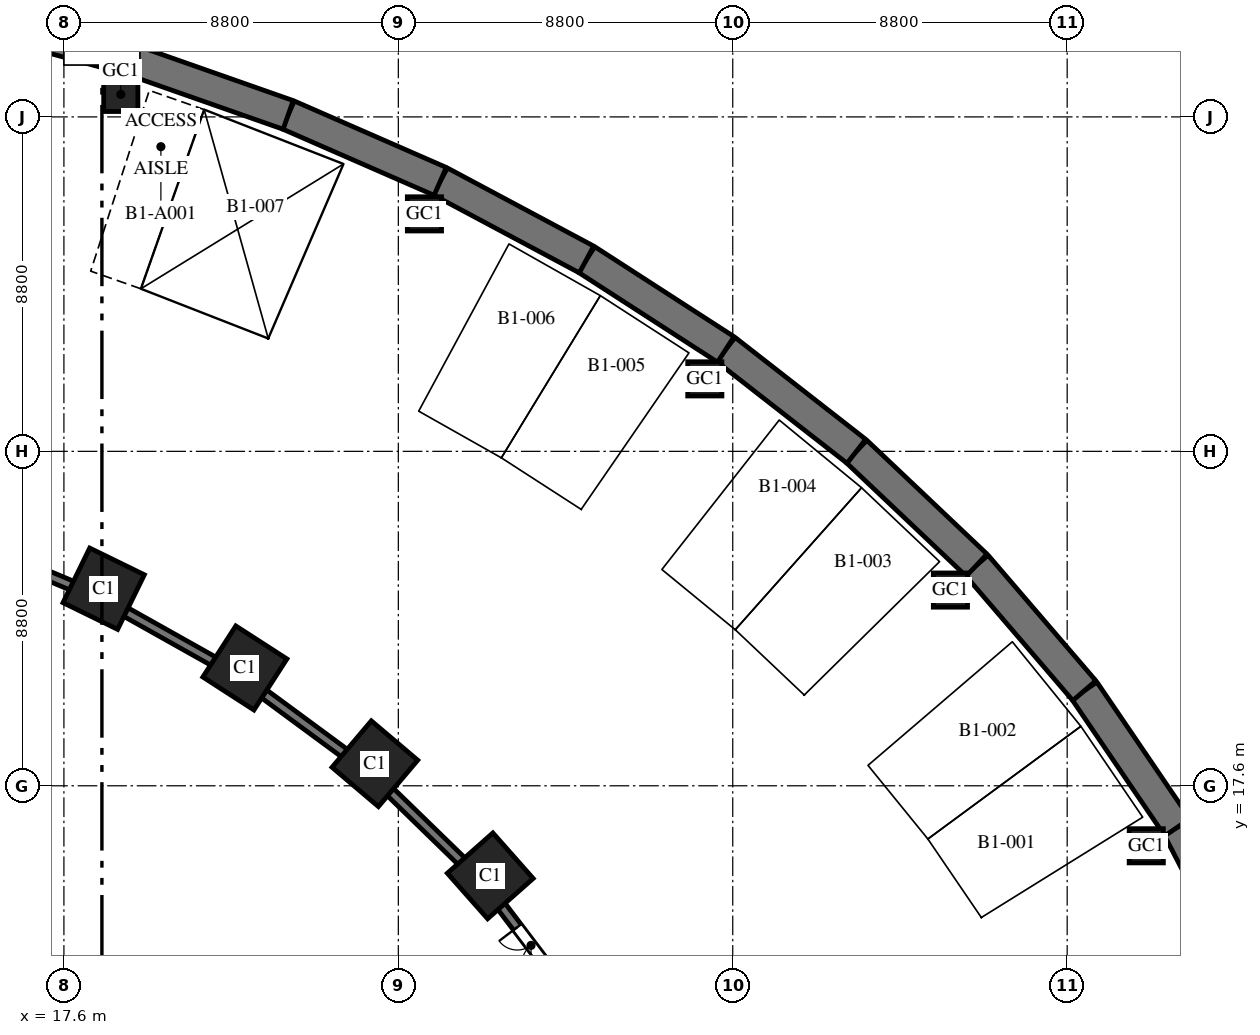
"""IFC4 building model, lengths in metres.
Left out: names, types, materials, properties, quantities, classifications, styles, units other than length and angle.
Written with IfcOpenShell. Run it as: python <this file> out.ifc"""

import sys

from ifc_helpers import new_model, si_unit, direction, frame, frame_2d, origin, origin_2d, place, context, subcontext, project, spatial, rectangle, hollow_rectangle, extrude, element, fill, save


model = new_model("IFC4")
c1 = context("Model", 3, precision=1e-05, world=origin(), true_north=direction((0.0, 1.0)))
c2 = subcontext(c1, "Body", "Model", "MODEL_VIEW")
j1 = project(units=[si_unit("LENGTHUNIT", "METRE"), si_unit("PLANEANGLEUNIT", "RADIAN")], contexts=[c1])
p1 = place(None, origin())
s1 = spatial("IfcSite", under=j1, at=p1, CompositionType="ELEMENT")
p2 = place(p1, origin())
s2 = spatial("IfcBuilding", under=s1, at=p2, CompositionType="ELEMENT")
p3 = place(p2, frame((0.0, 0.0, -4.2)))
s3 = spatial("IfcBuildingStorey", under=s2, at=p3, CompositionType="ELEMENT", Elevation=-4.2)
p4 = place(p3, frame((48.894, 12.649, 0.0), z_axis=(0.0, 0.0, 1.0), x_axis=(-0.459242531468, 0.888310923771, 0.0)))
e1 = element("IfcWall", 1, at=p4, inside=s3, PredefinedType="SOLIDWALL", context=c2, shape_type="SweptSolid", body=[
    extrude(rectangle(XDim=4.345, YDim=0.8, at=frame_2d((2.172, 0.0))), origin(), (0.0, 0.0, 1.0), 3.85),
])
p5 = place(p3, frame((46.899, 16.508, 0.0), z_axis=(0.0, 0.0, 1.0), x_axis=(-0.562667738859, 0.82668314102, 0.0)))
e2 = element("IfcWall", 2, at=p5, inside=s3, PredefinedType="SOLIDWALL", context=c2, shape_type="SweptSolid", body=[
    extrude(rectangle(XDim=4.349, YDim=0.8, at=frame_2d((2.174, 0.0))), origin(), (0.0, 0.0, 1.0), 3.85),
])
p6 = place(p3, frame((44.452, 20.104, 0.0), z_axis=(0.0, 0.0, 1.0), x_axis=(-0.651387059497, 0.758745608699, 0.0)))
e3 = element("IfcWall", 3, at=p6, inside=s3, PredefinedType="SOLIDWALL", context=c2, shape_type="SweptSolid", body=[
    extrude(rectangle(XDim=4.353, YDim=0.8, at=frame_2d((2.176, 0.0))), origin(), (0.0, 0.0, 1.0), 3.85),
])
p7 = place(p3, frame((41.617, 23.406, 0.0), z_axis=(0.0, 0.0, 1.0), x_axis=(-0.72620446032, 0.687478786444, 0.0)))
e4 = element("IfcWall", 4, at=p7, inside=s3, PredefinedType="SOLIDWALL", context=c2, shape_type="SweptSolid", body=[
    extrude(rectangle(XDim=4.356, YDim=0.8, at=frame_2d((2.178, 0.0))), origin(), (0.0, 0.0, 1.0), 3.85),
])
p8 = place(p3, frame((38.453, 26.401, 0.0), z_axis=(0.0, 0.0, 1.0), x_axis=(-0.788491985196, 0.615045030288, 0.0)))
e5 = element("IfcWall", 5, at=p8, inside=s3, PredefinedType="SOLIDWALL", context=c2, shape_type="SweptSolid", body=[
    extrude(rectangle(XDim=4.359, YDim=0.8, at=frame_2d((2.18, 0.0))), origin(), (0.0, 0.0, 1.0), 3.85),
])
p9 = place(p3, frame((35.016, 29.082, 0.0), z_axis=(0.0, 0.0, 1.0), x_axis=(-0.840047348843, 0.542513088969, 0.0)))
e6 = element("IfcWall", 6, at=p9, inside=s3, PredefinedType="SOLIDWALL", context=c2, shape_type="SweptSolid", body=[
    extrude(rectangle(XDim=4.362, YDim=0.8, at=frame_2d((2.181, 0.0))), origin(), (0.0, 0.0, 1.0), 3.85),
])
p10 = place(p3, frame((31.352, 31.448, 0.0), z_axis=(0.0, 0.0, 1.0), x_axis=(-0.882159305704, 0.47095112205, 0.0)))
e7 = element("IfcWall", 7, at=p10, inside=s3, PredefinedType="SOLIDWALL", context=c2, shape_type="SweptSolid", body=[
    extrude(rectangle(XDim=4.365, YDim=0.8, at=frame_2d((2.182, 0.0))), origin(), (0.0, 0.0, 1.0), 3.85),
])
p11 = place(p3, frame((27.501, 33.504, 0.0), z_axis=(0.0, 0.0, 1.0), x_axis=(-0.916336904548, 0.400408138483, 0.0)))
e8 = element("IfcWall", 8, at=p11, inside=s3, PredefinedType="SOLIDWALL", context=c2, shape_type="SweptSolid", body=[
    extrude(rectangle(XDim=4.366, YDim=0.8, at=frame_2d((2.183, 0.0))), origin(), (0.0, 0.0, 1.0), 3.85),
])
p12 = place(p3, frame((23.5, 35.252, 0.0), z_axis=(0.0, 0.0, 1.0), x_axis=(-0.943526738033, 0.331296384853, 0.0)))
e9 = element("IfcWall", 9, at=p12, inside=s3, PredefinedType="SOLIDWALL", context=c2, shape_type="SweptSolid", body=[
    extrude(rectangle(XDim=4.368, YDim=0.8, at=frame_2d((2.184, 0.0))), origin(), (0.0, 0.0, 1.0), 3.85),
])
p13 = place(p3, frame((19.379, 36.699, 0.0), z_axis=(0.0, 0.0, 1.0), x_axis=(-0.964679950239, 0.263424739931, 0.0)))
e10 = element("IfcWall", 10, at=p13, inside=s3, PredefinedType="SOLIDWALL", context=c2, shape_type="SweptSolid", body=[
    extrude(rectangle(XDim=4.369, YDim=0.8, at=frame_2d((2.185, 0.0))), origin(), (0.0, 0.0, 1.0), 3.85),
])
for number, where, z_axis, x_axis in (
    (11, (28.819, 15.23, 0.0), (0.0, 0.0, 1.0), (-0.663, 0.749, 0.0)),
    (12, (25.783, 18.18, 0.0), (0.0, 0.0, 1.0), (-0.763, 0.646, 0.0)),
    (13, (22.362, 20.7, 0.0), (0.0, 0.0, 1.0), (-0.84, 0.542, 0.0)),
    (14, (18.646, 22.785, 0.0), (0.0, 0.0, 1.0), (-0.898, 0.439, 0.0)),
):
    element("IfcColumn", number, at=place(p3, frame(where, z_axis=z_axis, x_axis=x_axis)), inside=s3, PredefinedType="COLUMN", context=c2, shape_type="SweptSolid", body=[
        extrude(rectangle(XDim=1.6, YDim=1.6, at=origin_2d()), origin(), (0.0, 0.0, 1.0), 4.2),
    ])
for number, where, z_axis, x_axis in (
    (15, (46.081, 16.021, 0.0), (0.0, 0.0, 1.0), (1.0, 0.0, 0.0)),
    (16, (40.928, 22.75, 0.0), (0.0, 0.0, 1.0), (1.0, 0.0, 0.0)),
    (17, (34.465, 28.307, 0.0), (0.0, 0.0, 1.0), (1.0, 0.0, 0.0)),
    (18, (27.087, 32.648, 0.0), (0.0, 0.0, 1.0), (1.0, 0.0, 0.0)),
    (19, (19.097, 35.792, 0.0), (0.0, 0.0, 1.0), (1.0, 0.0, 0.0)),
):
    element("IfcColumn", number, at=place(p3, frame(where, z_axis=z_axis, x_axis=x_axis)), inside=s3, PredefinedType="COLUMN", context=c2, shape_type="SweptSolid", body=[
        extrude(hollow_rectangle(XDim=0.9, YDim=0.9, WallThickness=0.045, at=origin_2d()), origin(), (0.0, 0.0, 1.0), 4.2),
    ])
p14 = place(p3, frame((31.148, 11.744, 0.0), z_axis=(0.0, 0.0, 1.0), x_axis=(-0.604041965907, 0.796952510143, 0.0)))
e20 = element("IfcWall", 20, at=p14, inside=s3, PredefinedType="SOLIDWALL", context=c2, shape_type="SweptSolid", body=[
    extrude(rectangle(XDim=4.157, YDim=0.25, at=frame_2d((2.079, 0.0))), origin(), (0.0, 0.0, 1.0), 2.95),
])
p15 = place(p14, frame((1.479, 0.0, 0.0)))
e21 = element("IfcOpeningElement", 21, at=p15, cuts=e20, PredefinedType="OPENING", context=c2, shape_type="SweptSolid", body=[
    extrude(rectangle(XDim=1.2, YDim=2.1, at=frame_2d((0.6, 1.05))), frame((0.0, 0.135, 0.0), z_axis=(0.0, -1.0, 0.0), x_axis=(1.0, 0.0, 0.0)), (0.0, 0.0, 1.0), 0.27),
])
p16 = place(p3, frame((28.625, 15.071, 0.0), z_axis=(0.0, 0.0, 1.0), x_axis=(-0.717227656803, 0.696838925661, 0.0)))
e22 = element("IfcWall", 22, at=p16, inside=s3, PredefinedType="SOLIDWALL", context=c2, shape_type="SweptSolid", body=[
    extrude(rectangle(XDim=4.179, YDim=0.25, at=frame_2d((2.089, 0.0))), origin(), (0.0, 0.0, 1.0), 2.95),
])
p17 = place(p3, frame((25.614, 17.994, 0.0), z_axis=(0.0, 0.0, 1.0), x_axis=(-0.805155221937, 0.593064135306, 0.0)))
e23 = element("IfcWall", 23, at=p17, inside=s3, PredefinedType="SOLIDWALL", context=c2, shape_type="SweptSolid", body=[
    extrude(rectangle(XDim=4.198, YDim=0.25, at=frame_2d((2.099, 0.0))), origin(), (0.0, 0.0, 1.0), 2.95),
])
p18 = place(p3, frame((22.219, 20.494, 0.0), z_axis=(0.0, 0.0, 1.0), x_axis=(-0.872061015455, 0.489397165218, 0.0)))
e24 = element("IfcWall", 24, at=p18, inside=s3, PredefinedType="SOLIDWALL", context=c2, shape_type="SweptSolid", body=[
    extrude(rectangle(XDim=4.213, YDim=0.25, at=frame_2d((2.107, 0.0))), origin(), (0.0, 0.0, 1.0), 2.95),
])
p19 = place(p3, frame((18.528, 22.564, 0.0), z_axis=(0.0, 0.0, 1.0), x_axis=(-0.921810386469, 0.387641085798, 0.0)))
e25 = element("IfcWall", 25, at=p19, inside=s3, PredefinedType="SOLIDWALL", context=c2, shape_type="SweptSolid", body=[
    extrude(rectangle(XDim=4.225, YDim=0.25, at=frame_2d((2.113, 0.0))), origin(), (0.0, 0.0, 1.0), 2.95),
])
p20 = place(p15, origin())
e26 = element("IfcDoor", 26, at=p20, inside=s3, OperationType="DOUBLE_DOOR_SINGLE_SWING", PredefinedType="DOOR", context=c2, shape_type="SweptSolid", body=[
    extrude(rectangle(XDim=1.2, YDim=2.1, at=frame_2d((0.6, 1.05))), frame((0.0, 0.025, 0.0), z_axis=(0.0, -1.0, 0.0), x_axis=(1.0, 0.0, 0.0)), (0.0, 0.0, 1.0), 0.05),
])
fill(e21, e26)
save(model, sys.argv[1])
